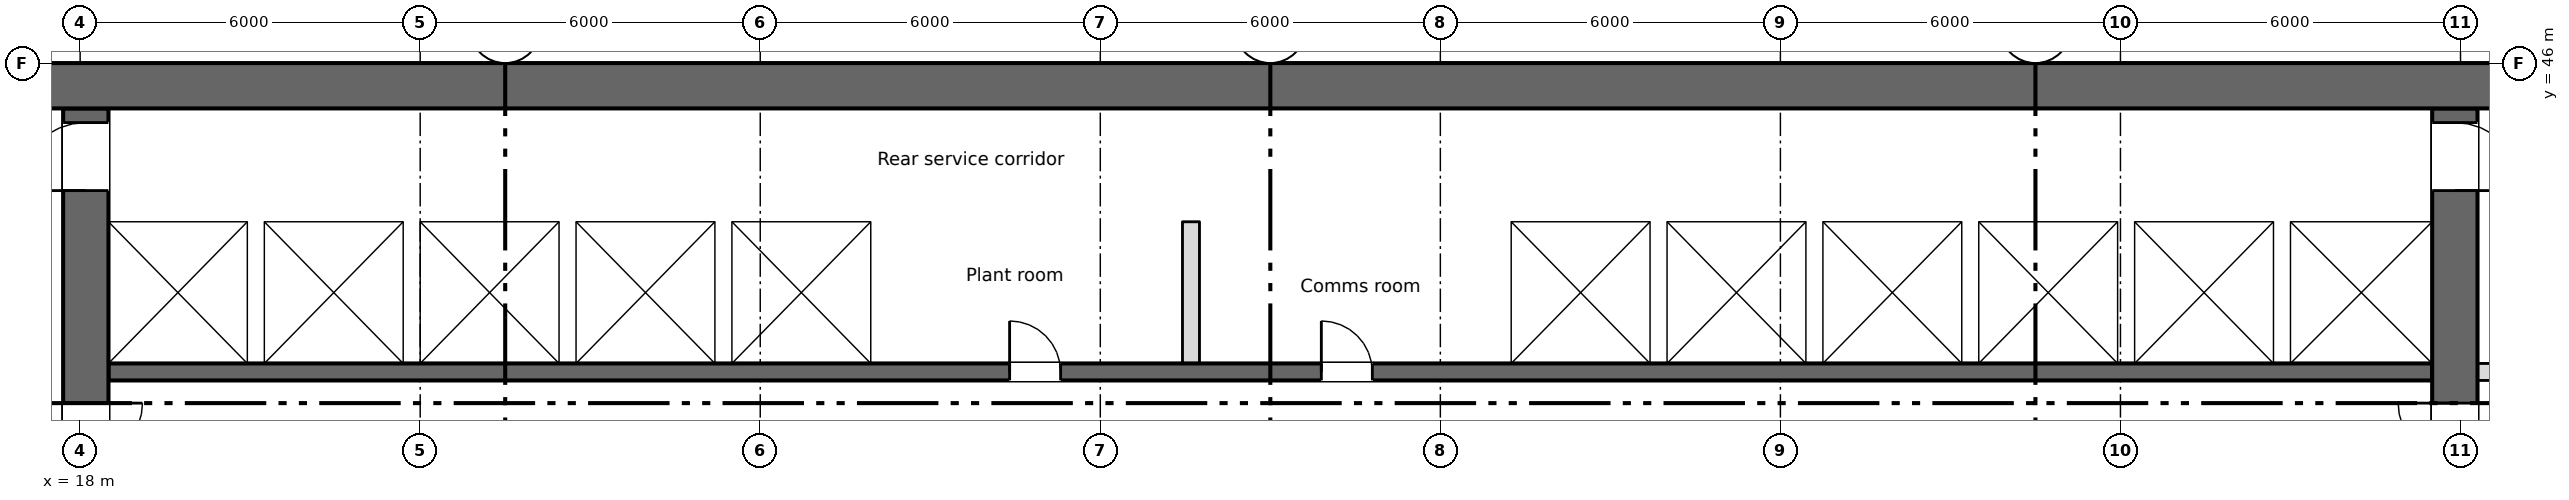
"""IFC4 building model, lengths in metres.
Left out: names, types, materials, properties, quantities, classifications, styles, units other than length and angle.
Written with IfcOpenShell. Run it as: python <this file> out.ifc"""

import sys

from ifc_helpers import new_model, si_unit, direction, frame, frame_2d, origin, place, context, subcontext, project, spatial, rectangle, extrude, element, fill, save


model = new_model("IFC4")
c1 = context("Model", 3, precision=1e-05, world=origin(), true_north=direction((0.0, 1.0)))
c2 = subcontext(c1, "Body", "Model", "MODEL_VIEW")
j1 = project(units=[si_unit("LENGTHUNIT", "METRE"), si_unit("PLANEANGLEUNIT", "RADIAN")], contexts=[c1])
p1 = place(None, origin())
s1 = spatial("IfcSite", under=j1, at=p1, CompositionType="ELEMENT")
p2 = place(p1, origin())
s2 = spatial("IfcBuilding", under=s1, at=p2, CompositionType="ELEMENT")
p3 = place(p2, frame((0.0, 0.0, 136.25)))
s3 = spatial("IfcBuildingStorey", under=s2, at=p3, CompositionType="ELEMENT", Elevation=136.25)
p4 = place(p3, frame((5.55, 45.6, 0.0), z_axis=(0.0, 0.0, 1.0), x_axis=(1.0, 0.0, 0.0)))
e1 = element("IfcWall", 1, at=p4, inside=s3, PredefinedType="SHEAR", context=c2, shape_type="SweptSolid", body=[
    extrude(rectangle(XDim=60.9, YDim=0.8, at=frame_2d((30.45, 0.0))), origin(), (0.0, 0.0, 1.0), 3.35),
])
p5 = place(p4, frame((1.2, 0.0, 0.6)))
e2 = element("IfcOpeningElement", 2, at=p5, cuts=e1, PredefinedType="OPENING", context=c2, shape_type="SweptSolid", body=[
    extrude(rectangle(XDim=0.6, YDim=2.4, at=frame_2d((0.3, 1.2))), frame((0.0, 0.41, 0.0), z_axis=(0.0, -1.0, 0.0), x_axis=(1.0, 0.0, 0.0)), (0.0, 0.0, 1.0), 0.82),
])
p6 = place(p4, frame((7.2, 0.0, 0.6)))
e3 = element("IfcOpeningElement", 3, at=p6, cuts=e1, PredefinedType="OPENING", context=c2, shape_type="SweptSolid", body=[
    extrude(rectangle(XDim=0.6, YDim=2.4, at=frame_2d((0.3, 1.2))), frame((0.0, 0.41, 0.0), z_axis=(0.0, -1.0, 0.0), x_axis=(1.0, 0.0, 0.0)), (0.0, 0.0, 1.0), 0.82),
])
p7 = place(p4, frame((55.2, 0.0, 0.6)))
e4 = element("IfcOpeningElement", 4, at=p7, cuts=e1, PredefinedType="OPENING", context=c2, shape_type="SweptSolid", body=[
    extrude(rectangle(XDim=0.6, YDim=2.4, at=frame_2d((0.3, 1.2))), frame((0.0, 0.41, 0.0), z_axis=(0.0, -1.0, 0.0), x_axis=(1.0, 0.0, 0.0)), (0.0, 0.0, 1.0), 0.82),
])
p8 = place(p3, frame((18.1, 28.4, 0.0), z_axis=(0.0, 0.0, 1.0), x_axis=(0.0, 1.0, 0.0)))
e5 = element("IfcWall", 5, at=p8, inside=s3, PredefinedType="SHEAR", context=c2, shape_type="SweptSolid", body=[
    extrude(rectangle(XDim=16.8, YDim=0.8, at=frame_2d((8.4, 0.0))), origin(), (0.0, 0.0, 1.0), 3.35),
])
p9 = place(p8, frame((9.6, 0.0, 0.0)))
e6 = element("IfcOpeningElement", 6, at=p9, cuts=e5, PredefinedType="OPENING", context=c2, shape_type="SweptSolid", body=[
    extrude(rectangle(XDim=2.0, YDim=2.1, at=frame_2d((1.0, 1.05))), frame((0.0, 0.41, 0.0), z_axis=(0.0, -1.0, 0.0), x_axis=(1.0, 0.0, 0.0)), (0.0, 0.0, 1.0), 0.82),
])
p10 = place(p8, frame((15.35, 0.0, 0.0)))
e7 = element("IfcOpeningElement", 7, at=p10, cuts=e5, PredefinedType="OPENING", context=c2, shape_type="SweptSolid", body=[
    extrude(rectangle(XDim=1.2, YDim=2.1, at=frame_2d((0.6, 1.05))), frame((0.0, 0.41, 0.0), z_axis=(0.0, -1.0, 0.0), x_axis=(1.0, 0.0, 0.0)), (0.0, 0.0, 1.0), 0.82),
])
p11 = place(p3, frame((59.9, 28.4, 0.0), z_axis=(0.0, 0.0, 1.0), x_axis=(0.0, 1.0, 0.0)))
e8 = element("IfcWall", 8, at=p11, inside=s3, PredefinedType="SHEAR", context=c2, shape_type="SweptSolid", body=[
    extrude(rectangle(XDim=16.8, YDim=0.8, at=frame_2d((8.4, 0.0))), origin(), (0.0, 0.0, 1.0), 3.35),
])
p12 = place(p11, frame((9.6, 0.0, 0.0)))
e9 = element("IfcOpeningElement", 9, at=p12, cuts=e8, PredefinedType="OPENING", context=c2, shape_type="SweptSolid", body=[
    extrude(rectangle(XDim=2.0, YDim=2.1, at=frame_2d((1.0, 1.05))), frame((0.0, 0.41, 0.0), z_axis=(0.0, -1.0, 0.0), x_axis=(1.0, 0.0, 0.0)), (0.0, 0.0, 1.0), 0.82),
])
p13 = place(p11, frame((15.35, 0.0, 0.0)))
e10 = element("IfcOpeningElement", 10, at=p13, cuts=e8, PredefinedType="OPENING", context=c2, shape_type="SweptSolid", body=[
    extrude(rectangle(XDim=1.2, YDim=2.1, at=frame_2d((0.6, 1.05))), frame((0.0, 0.41, 0.0), z_axis=(0.0, -1.0, 0.0), x_axis=(1.0, 0.0, 0.0)), (0.0, 0.0, 1.0), 0.82),
])
p14 = place(p3, frame((18.5, 40.55, 0.0), z_axis=(0.0, 0.0, 1.0), x_axis=(1.0, 0.0, 0.0)))
e11 = element("IfcWall", 11, at=p14, inside=s3, PredefinedType="SHEAR", context=c2, shape_type="SweptSolid", body=[
    extrude(rectangle(XDim=41.0, YDim=0.3, at=frame_2d((20.5, 0.0))), origin(), (0.0, 0.0, 1.0), 3.35),
])
p15 = place(p14, frame((15.9, 0.0, 0.0)))
e12 = element("IfcOpeningElement", 12, at=p15, cuts=e11, PredefinedType="OPENING", context=c2, shape_type="SweptSolid", body=[
    extrude(rectangle(XDim=0.9, YDim=2.1, at=frame_2d((0.45, 1.05))), frame((0.0, 0.16, 0.0), z_axis=(0.0, -1.0, 0.0), x_axis=(1.0, 0.0, 0.0)), (0.0, 0.0, 1.0), 0.32),
])
p16 = place(p14, frame((21.4, 0.0, 0.0)))
e13 = element("IfcOpeningElement", 13, at=p16, cuts=e11, PredefinedType="OPENING", context=c2, shape_type="SweptSolid", body=[
    extrude(rectangle(XDim=0.9, YDim=2.1, at=frame_2d((0.45, 1.05))), frame((0.0, 0.16, 0.0), z_axis=(0.0, -1.0, 0.0), x_axis=(1.0, 0.0, 0.0)), (0.0, 0.0, 1.0), 0.32),
])
p17 = place(p14, frame((6.175, 0.0, 0.0)))
e14 = element("IfcOpeningElement", 14, at=p17, cuts=e11, PredefinedType="OPENING", context=c2, shape_type="SweptSolid", body=[
    extrude(rectangle(XDim=1.1, YDim=2.1, at=frame_2d((0.55, 1.05))), frame((0.0, 0.16, 0.0), z_axis=(0.0, -1.0, 0.0), x_axis=(1.0, 0.0, 0.0)), (0.0, 0.0, 1.0), 0.32),
])
p18 = place(p14, frame((8.925, 0.0, 0.0)))
e15 = element("IfcOpeningElement", 15, at=p18, cuts=e11, PredefinedType="OPENING", context=c2, shape_type="SweptSolid", body=[
    extrude(rectangle(XDim=1.1, YDim=2.1, at=frame_2d((0.55, 1.05))), frame((0.0, 0.16, 0.0), z_axis=(0.0, -1.0, 0.0), x_axis=(1.0, 0.0, 0.0)), (0.0, 0.0, 1.0), 0.32),
])
p19 = place(p14, frame((11.675, 0.0, 0.0)))
e16 = element("IfcOpeningElement", 16, at=p19, cuts=e11, PredefinedType="OPENING", context=c2, shape_type="SweptSolid", body=[
    extrude(rectangle(XDim=1.1, YDim=2.1, at=frame_2d((0.55, 1.05))), frame((0.0, 0.16, 0.0), z_axis=(0.0, -1.0, 0.0), x_axis=(1.0, 0.0, 0.0)), (0.0, 0.0, 1.0), 0.32),
])
p20 = place(p14, frame((30.925, 0.0, 0.0)))
e17 = element("IfcOpeningElement", 17, at=p20, cuts=e11, PredefinedType="OPENING", context=c2, shape_type="SweptSolid", body=[
    extrude(rectangle(XDim=1.1, YDim=2.1, at=frame_2d((0.55, 1.05))), frame((0.0, 0.16, 0.0), z_axis=(0.0, -1.0, 0.0), x_axis=(1.0, 0.0, 0.0)), (0.0, 0.0, 1.0), 0.32),
])
p21 = place(p14, frame((33.675, 0.0, 0.0)))
e18 = element("IfcOpeningElement", 18, at=p21, cuts=e11, PredefinedType="OPENING", context=c2, shape_type="SweptSolid", body=[
    extrude(rectangle(XDim=1.1, YDim=2.1, at=frame_2d((0.55, 1.05))), frame((0.0, 0.16, 0.0), z_axis=(0.0, -1.0, 0.0), x_axis=(1.0, 0.0, 0.0)), (0.0, 0.0, 1.0), 0.32),
])
p22 = place(p14, frame((36.375, 0.0, 0.0)))
e19 = element("IfcOpeningElement", 19, at=p22, cuts=e11, PredefinedType="OPENING", context=c2, shape_type="SweptSolid", body=[
    extrude(rectangle(XDim=1.2, YDim=2.1, at=frame_2d((0.6, 1.05))), frame((0.0, 0.16, 0.0), z_axis=(0.0, -1.0, 0.0), x_axis=(1.0, 0.0, 0.0)), (0.0, 0.0, 1.0), 0.32),
])
p23 = place(p14, frame((39.15, 0.0, 0.0)))
e20 = element("IfcOpeningElement", 20, at=p23, cuts=e11, PredefinedType="OPENING", context=c2, shape_type="SweptSolid", body=[
    extrude(rectangle(XDim=1.2, YDim=2.1, at=frame_2d((0.6, 1.05))), frame((0.0, 0.16, 0.0), z_axis=(0.0, -1.0, 0.0), x_axis=(1.0, 0.0, 0.0)), (0.0, 0.0, 1.0), 0.32),
])
p24 = place(p3, frame((18.5, 43.35, 0.0), z_axis=(0.0, 0.0, 1.0), x_axis=(1.0, 0.0, 0.0)))
e21 = element("IfcWall", 21, at=p24, inside=s3, PredefinedType="SHEAR", context=c2, shape_type="SweptSolid", body=[
    extrude(rectangle(XDim=41.0, YDim=0.3, at=frame_2d((20.5, 0.0))), origin(), (0.0, 0.0, 1.0), 3.35),
])
p25 = place(p3, frame((60.3, 40.55, 0.0), z_axis=(0.0, 0.0, 1.0), x_axis=(1.0, 0.0, 0.0)))
e22 = element("IfcWall", 22, at=p25, inside=s3, PredefinedType="PARTITIONING", context=c2, shape_type="SweptSolid", body=[
    extrude(rectangle(XDim=2.4, YDim=0.3, at=frame_2d((1.2, 0.0))), origin(), (0.0, 0.0, 1.0), 3.35),
])
p26 = place(p25, frame((0.675, 0.0, 0.0)))
e23 = element("IfcOpeningElement", 23, at=p26, cuts=e22, PredefinedType="OPENING", context=c2, shape_type="SweptSolid", body=[
    extrude(rectangle(XDim=0.9, YDim=2.1, at=frame_2d((0.45, 1.05))), frame((0.0, 0.16, 0.0), z_axis=(0.0, -1.0, 0.0), x_axis=(1.0, 0.0, 0.0)), (0.0, 0.0, 1.0), 0.32),
])
for number, where, z_axis, x_axis in (
    (24, (21.1, 40.7, 0.0), (0.0, 0.0, 1.0), (0.0, 1.0, 0.0)),
    (25, (23.85, 40.7, 0.0), (0.0, 0.0, 1.0), (0.0, 1.0, 0.0)),
    (26, (26.6, 40.7, 0.0), (0.0, 0.0, 1.0), (0.0, 1.0, 0.0)),
    (27, (29.35, 40.7, 0.0), (0.0, 0.0, 1.0), (0.0, 1.0, 0.0)),
    (28, (32.1, 40.7, 0.0), (0.0, 0.0, 1.0), (0.0, 1.0, 0.0)),
    (29, (43.1, 40.7, 0.0), (0.0, 0.0, 1.0), (0.0, 1.0, 0.0)),
    (30, (45.85, 40.7, 0.0), (0.0, 0.0, 1.0), (0.0, 1.0, 0.0)),
    (31, (48.6, 40.7, 0.0), (0.0, 0.0, 1.0), (0.0, 1.0, 0.0)),
    (32, (51.35, 40.7, 0.0), (0.0, 0.0, 1.0), (0.0, 1.0, 0.0)),
    (33, (54.1, 40.7, 0.0), (0.0, 0.0, 1.0), (0.0, 1.0, 0.0)),
    (34, (56.85, 40.7, 0.0), (0.0, 0.0, 1.0), (0.0, 1.0, 0.0)),
):
    element("IfcWall", number, at=place(p3, frame(where, z_axis=z_axis, x_axis=x_axis)), inside=s3, PredefinedType="SHEAR", context=c2, shape_type="SweptSolid", body=[
        extrude(rectangle(XDim=2.5, YDim=0.3, at=frame_2d((1.25, 0.0))), origin(), (0.0, 0.0, 1.0), 3.35),
    ])
p27 = place(p3, frame((37.6, 40.7, 0.0), z_axis=(0.0, 0.0, 1.0), x_axis=(0.0, 1.0, 0.0)))
e35 = element("IfcWall", 35, at=p27, inside=s3, PredefinedType="PARTITIONING", context=c2, shape_type="SweptSolid", body=[
    extrude(rectangle(XDim=2.5, YDim=0.3, at=frame_2d((1.25, 0.0))), origin(), (0.0, 0.0, 1.0), 3.35),
])
p28 = place(p15, origin())
e36 = element("IfcDoor", 36, at=p28, inside=s3, OperationType="SINGLE_SWING_LEFT", PredefinedType="DOOR", context=c2, shape_type="SweptSolid", body=[
    extrude(rectangle(XDim=0.9, YDim=2.1, at=frame_2d((0.45, 1.05))), frame((0.0, 0.025, 0.0), z_axis=(0.0, -1.0, 0.0), x_axis=(1.0, 0.0, 0.0)), (0.0, 0.0, 1.0), 0.05),
])
fill(e12, e36)
p29 = place(p16, origin())
e37 = element("IfcDoor", 37, at=p29, inside=s3, OperationType="SINGLE_SWING_LEFT", PredefinedType="DOOR", context=c2, shape_type="SweptSolid", body=[
    extrude(rectangle(XDim=0.9, YDim=2.1, at=frame_2d((0.45, 1.05))), frame((0.0, 0.025, 0.0), z_axis=(0.0, -1.0, 0.0), x_axis=(1.0, 0.0, 0.0)), (0.0, 0.0, 1.0), 0.05),
])
fill(e13, e37)
p30 = place(p17, origin())
e38 = element("IfcDoor", 38, at=p30, inside=s3, OperationType="SLIDING_TO_LEFT", PredefinedType="DOOR", context=c2, shape_type="SweptSolid", body=[
    extrude(rectangle(XDim=1.1, YDim=2.1, at=frame_2d((0.55, 1.05))), frame((0.0, 0.025, 0.0), z_axis=(0.0, -1.0, 0.0), x_axis=(1.0, 0.0, 0.0)), (0.0, 0.0, 1.0), 0.05),
])
fill(e14, e38)
p31 = place(p18, origin())
e39 = element("IfcDoor", 39, at=p31, inside=s3, OperationType="SLIDING_TO_LEFT", PredefinedType="DOOR", context=c2, shape_type="SweptSolid", body=[
    extrude(rectangle(XDim=1.1, YDim=2.1, at=frame_2d((0.55, 1.05))), frame((0.0, 0.025, 0.0), z_axis=(0.0, -1.0, 0.0), x_axis=(1.0, 0.0, 0.0)), (0.0, 0.0, 1.0), 0.05),
])
fill(e15, e39)
p32 = place(p19, origin())
e40 = element("IfcDoor", 40, at=p32, inside=s3, OperationType="SLIDING_TO_LEFT", PredefinedType="DOOR", context=c2, shape_type="SweptSolid", body=[
    extrude(rectangle(XDim=1.1, YDim=2.1, at=frame_2d((0.55, 1.05))), frame((0.0, 0.025, 0.0), z_axis=(0.0, -1.0, 0.0), x_axis=(1.0, 0.0, 0.0)), (0.0, 0.0, 1.0), 0.05),
])
fill(e16, e40)
p33 = place(p20, origin())
e41 = element("IfcDoor", 41, at=p33, inside=s3, OperationType="SLIDING_TO_LEFT", PredefinedType="DOOR", context=c2, shape_type="SweptSolid", body=[
    extrude(rectangle(XDim=1.1, YDim=2.1, at=frame_2d((0.55, 1.05))), frame((0.0, 0.025, 0.0), z_axis=(0.0, -1.0, 0.0), x_axis=(1.0, 0.0, 0.0)), (0.0, 0.0, 1.0), 0.05),
])
fill(e17, e41)
p34 = place(p21, origin())
e42 = element("IfcDoor", 42, at=p34, inside=s3, OperationType="SLIDING_TO_LEFT", PredefinedType="DOOR", context=c2, shape_type="SweptSolid", body=[
    extrude(rectangle(XDim=1.1, YDim=2.1, at=frame_2d((0.55, 1.05))), frame((0.0, 0.025, 0.0), z_axis=(0.0, -1.0, 0.0), x_axis=(1.0, 0.0, 0.0)), (0.0, 0.0, 1.0), 0.05),
])
fill(e18, e42)
p35 = place(p22, origin())
e43 = element("IfcDoor", 43, at=p35, inside=s3, OperationType="SLIDING_TO_LEFT", PredefinedType="DOOR", context=c2, shape_type="SweptSolid", body=[
    extrude(rectangle(XDim=1.2, YDim=2.1, at=frame_2d((0.6, 1.05))), frame((0.0, 0.025, 0.0), z_axis=(0.0, -1.0, 0.0), x_axis=(1.0, 0.0, 0.0)), (0.0, 0.0, 1.0), 0.05),
])
fill(e19, e43)
p36 = place(p23, origin())
e44 = element("IfcDoor", 44, at=p36, inside=s3, OperationType="SLIDING_TO_LEFT", PredefinedType="DOOR", context=c2, shape_type="SweptSolid", body=[
    extrude(rectangle(XDim=1.2, YDim=2.1, at=frame_2d((0.6, 1.05))), frame((0.0, 0.025, 0.0), z_axis=(0.0, -1.0, 0.0), x_axis=(1.0, 0.0, 0.0)), (0.0, 0.0, 1.0), 0.05),
])
fill(e20, e44)
p37 = place(p9, origin())
e45 = element("IfcDoor", 45, at=p37, inside=s3, OperationType="DOUBLE_DOOR_SINGLE_SWING", PredefinedType="DOOR", context=c2, shape_type="SweptSolid", body=[
    extrude(rectangle(XDim=2.0, YDim=2.1, at=frame_2d((1.0, 1.05))), frame((0.0, 0.025, 0.0), z_axis=(0.0, -1.0, 0.0), x_axis=(1.0, 0.0, 0.0)), (0.0, 0.0, 1.0), 0.05),
])
fill(e6, e45)
p38 = place(p12, origin())
e46 = element("IfcDoor", 46, at=p38, inside=s3, OperationType="DOUBLE_DOOR_SINGLE_SWING", PredefinedType="DOOR", context=c2, shape_type="SweptSolid", body=[
    extrude(rectangle(XDim=2.0, YDim=2.1, at=frame_2d((1.0, 1.05))), frame((0.0, 0.025, 0.0), z_axis=(0.0, -1.0, 0.0), x_axis=(1.0, 0.0, 0.0)), (0.0, 0.0, 1.0), 0.05),
])
fill(e9, e46)
p39 = place(p10, origin())
e47 = element("IfcDoor", 47, at=p39, inside=s3, OperationType="SINGLE_SWING_LEFT", PredefinedType="DOOR", context=c2, shape_type="SweptSolid", body=[
    extrude(rectangle(XDim=1.2, YDim=2.1, at=frame_2d((0.6, 1.05))), frame((0.0, 0.025, 0.0), z_axis=(0.0, -1.0, 0.0), x_axis=(1.0, 0.0, 0.0)), (0.0, 0.0, 1.0), 0.05),
])
fill(e7, e47)
p40 = place(p13, origin())
e48 = element("IfcDoor", 48, at=p40, inside=s3, OperationType="SINGLE_SWING_LEFT", PredefinedType="DOOR", context=c2, shape_type="SweptSolid", body=[
    extrude(rectangle(XDim=1.2, YDim=2.1, at=frame_2d((0.6, 1.05))), frame((0.0, 0.025, 0.0), z_axis=(0.0, -1.0, 0.0), x_axis=(1.0, 0.0, 0.0)), (0.0, 0.0, 1.0), 0.05),
])
fill(e10, e48)
save(model, sys.argv[1])
